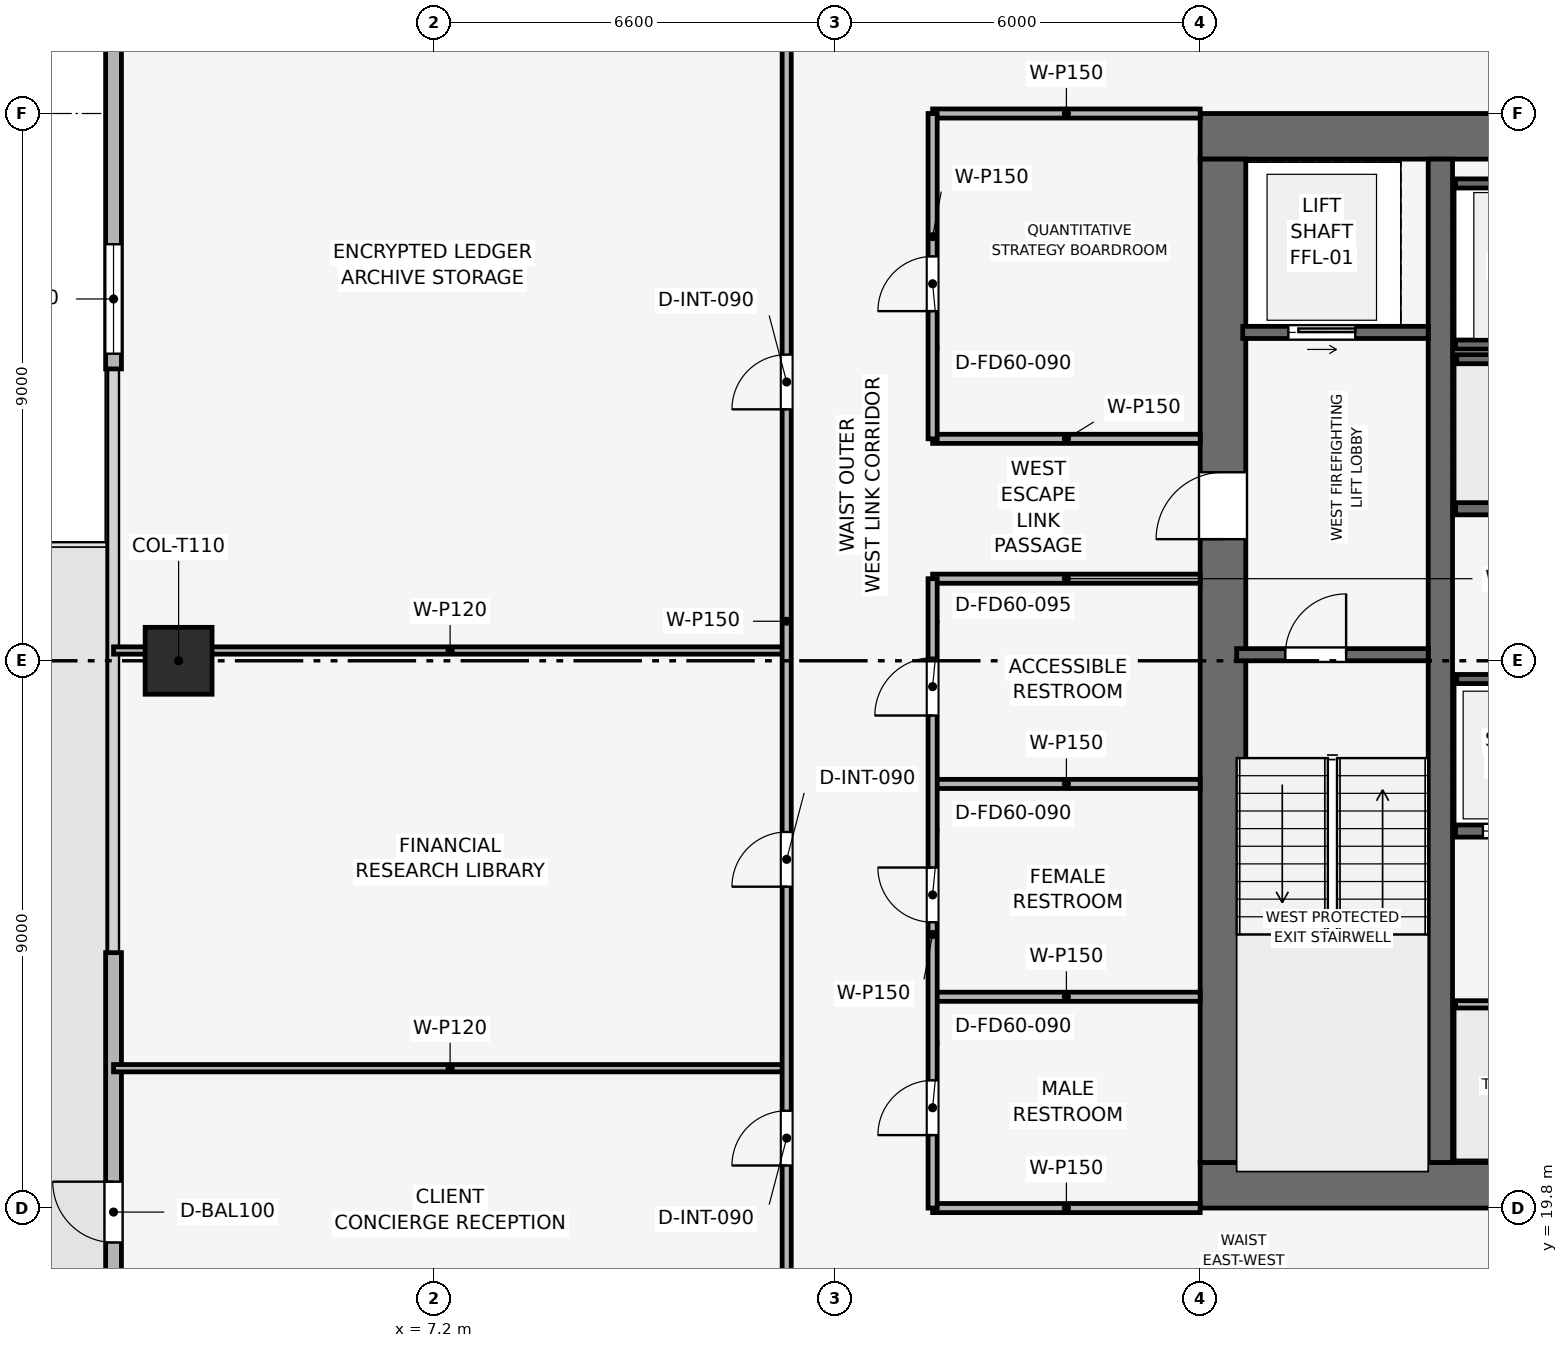
"""IFC4 building model, lengths in metres.
Left out: names, types, materials, properties, quantities, classifications, styles, units other than length and angle.
Written with IfcOpenShell. Run it as: python <this file> out.ifc"""

import sys

from ifc_helpers import new_model, si_unit, direction, frame, frame_2d, origin, origin_2d, place, context, subcontext, project, spatial, rectangle, extrude, element, fill, save


model = new_model("IFC4")
c1 = context("Model", 3, precision=1e-05, world=origin(), true_north=direction((0.0, 1.0)))
c2 = subcontext(c1, "Body", "Model", "MODEL_VIEW")
j1 = project(units=[si_unit("LENGTHUNIT", "METRE"), si_unit("PLANEANGLEUNIT", "RADIAN")], contexts=[c1])
p1 = place(None, origin())
s1 = spatial("IfcSite", under=j1, at=p1, CompositionType="ELEMENT")
p2 = place(p1, origin())
s2 = spatial("IfcBuilding", under=s1, at=p2, CompositionType="ELEMENT")
p3 = place(p2, frame((0.0, 0.0, 237.45)))
s3 = spatial("IfcBuildingStorey", under=s2, at=p3, CompositionType="ELEMENT", Elevation=237.45)
p4 = place(p3, frame((19.8, 20.175, 0.0), z_axis=(0.0, 0.0, 1.0), x_axis=(1.0, 0.0, 0.0)))
e1 = element("IfcWall", 1, at=p4, inside=s3, PredefinedType="SHEAR", context=c2, shape_type="SweptSolid", body=[
    extrude(rectangle(XDim=18.0, YDim=0.75, at=frame_2d((9.0, 0.0))), origin(), (0.0, 0.0, 1.0), 3.75),
])
p5 = place(p4, frame((8.4, 0.0, 0.0)))
e2 = element("IfcOpeningElement", 2, at=p5, cuts=e1, PredefinedType="OPENING", context=c2, shape_type="SweptSolid", body=[
    extrude(rectangle(XDim=1.2, YDim=2.2, at=frame_2d((0.6, 1.1))), frame((0.0, 0.385, 0.0), z_axis=(0.0, -1.0, 0.0), x_axis=(1.0, 0.0, 0.0)), (0.0, 0.0, 1.0), 0.77),
])
p6 = place(p3, frame((19.8, 37.425, 0.0), z_axis=(0.0, 0.0, 1.0), x_axis=(1.0, 0.0, 0.0)))
e3 = element("IfcWall", 3, at=p6, inside=s3, PredefinedType="SHEAR", context=c2, shape_type="SweptSolid", body=[
    extrude(rectangle(XDim=18.0, YDim=0.75, at=frame_2d((9.0, 0.0))), origin(), (0.0, 0.0, 1.0), 3.75),
])
p7 = place(p6, frame((7.05, 0.0, 0.0)))
e4 = element("IfcOpeningElement", 4, at=p7, cuts=e3, PredefinedType="OPENING", context=c2, shape_type="SweptSolid", body=[
    extrude(rectangle(XDim=1.1, YDim=2.15, at=frame_2d((0.55, 1.075))), frame((0.0, 0.385, 0.0), z_axis=(0.0, -1.0, 0.0), x_axis=(1.0, 0.0, 0.0)), (0.0, 0.0, 1.0), 0.77),
])
p8 = place(p3, frame((20.175, 20.55, 0.0), z_axis=(0.0, 0.0, 1.0), x_axis=(0.0, 1.0, 0.0)))
e5 = element("IfcWall", 5, at=p8, inside=s3, PredefinedType="SHEAR", context=c2, shape_type="SweptSolid", body=[
    extrude(rectangle(XDim=16.5, YDim=0.75, at=frame_2d((8.25, 0.0))), origin(), (0.0, 0.0, 1.0), 3.75),
])
p9 = place(p8, frame((10.25, 0.0, 0.0)))
e6 = element("IfcOpeningElement", 6, at=p9, cuts=e5, PredefinedType="OPENING", context=c2, shape_type="SweptSolid", body=[
    extrude(rectangle(XDim=1.1, YDim=2.15, at=frame_2d((0.55, 1.075))), frame((0.0, 0.385, 0.0), z_axis=(0.0, -1.0, 0.0), x_axis=(1.0, 0.0, 0.0)), (0.0, 0.0, 1.0), 0.77),
])
p10 = place(p3, frame((23.75, 20.55, 0.0), z_axis=(0.0, 0.0, 1.0), x_axis=(0.0, 1.0, 0.0)))
e7 = element("IfcWall", 7, at=p10, inside=s3, PredefinedType="SHEAR", context=c2, shape_type="SweptSolid", body=[
    extrude(rectangle(XDim=16.5, YDim=0.4, at=frame_2d((8.25, 0.0))), origin(), (0.0, 0.0, 1.0), 3.75),
])
p11 = place(p3, frame((3.0, 28.8, 0.003), z_axis=(0.0, 0.0, 1.0), x_axis=(1.0, 0.0, 0.0)))
e8 = element("IfcColumn", 8, at=p11, inside=s3, PredefinedType="COLUMN", context=c2, shape_type="SweptSolid", body=[
    extrude(rectangle(XDim=1.1, YDim=1.1, at=origin_2d()), origin(), (0.0, 0.0, 1.0), 3.494),
])
p12 = place(p3, frame((1.93, 9.3, 0.0), z_axis=(0.0, 0.0, 1.0), x_axis=(0.0, 1.0, 0.0)))
e9 = element("IfcWall", 9, at=p12, inside=s3, PredefinedType="SOLIDWALL", context=c2, shape_type="SweptSolid", body=[
    extrude(rectangle(XDim=14.7, YDim=0.26, at=frame_2d((7.35, 0.0))), origin(), (0.0, 0.0, 1.0), 3.5),
])
p13 = place(p12, frame((9.934, 0.0, 0.0)))
e10 = element("IfcOpeningElement", 10, at=p13, cuts=e9, PredefinedType="OPENING", context=c2, shape_type="SweptSolid", body=[
    extrude(rectangle(XDim=1.0, YDim=2.2, at=frame_2d((0.5, 1.1))), frame((0.0, 0.14, 0.0), z_axis=(0.0, -1.0, 0.0), x_axis=(1.0, 0.0, 0.0)), (0.0, 0.0, 1.0), 0.28),
])
p14 = place(p3, frame((1.93, 33.6, 0.0), z_axis=(0.0, 0.0, 1.0), x_axis=(0.0, 1.0, 0.0)))
e11 = element("IfcWall", 11, at=p14, inside=s3, PredefinedType="SOLIDWALL", context=c2, shape_type="SweptSolid", body=[
    extrude(rectangle(XDim=14.7, YDim=0.26, at=frame_2d((7.35, 0.0))), origin(), (0.0, 0.0, 1.0), 3.5),
])
p15 = place(p14, frame((0.25, 0.0, 0.72)))
e12 = element("IfcOpeningElement", 12, at=p15, cuts=e11, PredefinedType="OPENING", context=c2, shape_type="SweptSolid", body=[
    extrude(rectangle(XDim=1.8, YDim=2.1, at=frame_2d((0.9, 1.05))), frame((0.0, 0.14, 0.0), z_axis=(0.0, -1.0, 0.0), x_axis=(1.0, 0.0, 0.0)), (0.0, 0.0, 1.0), 0.28),
])
p16 = place(p3, frame((20.4, 28.9, 0.0), z_axis=(0.0, 0.0, 1.0), x_axis=(1.0, 0.0, 0.0)))
e13 = element("IfcWall", 13, at=p16, inside=s3, PredefinedType="SHEAR", context=c2, shape_type="SweptSolid", body=[
    extrude(rectangle(XDim=3.15, YDim=0.2, at=frame_2d((1.575, 0.0))), origin(), (0.0, 0.0, 1.0), 3.5),
])
p17 = place(p16, frame((0.8, 0.0, 0.0)))
e14 = element("IfcOpeningElement", 14, at=p17, cuts=e13, PredefinedType="OPENING", context=c2, shape_type="SweptSolid", body=[
    extrude(rectangle(XDim=1.0, YDim=2.1, at=frame_2d((0.5, 1.05))), frame((0.0, 0.11, 0.0), z_axis=(0.0, -1.0, 0.0), x_axis=(1.0, 0.0, 0.0)), (0.0, 0.0, 1.0), 0.22),
])
p18 = place(p3, frame((20.5, 34.2, 0.0), z_axis=(0.0, 0.0, 1.0), x_axis=(1.0, 0.0, 0.0)))
e15 = element("IfcWall", 15, at=p18, inside=s3, PredefinedType="SHEAR", context=c2, shape_type="SweptSolid", body=[
    extrude(rectangle(XDim=3.05, YDim=0.2, at=frame_2d((1.525, 0.0))), origin(), (0.0, 0.0, 1.0), 3.5),
])
p19 = place(p18, frame((0.75, 0.0, 0.0)))
e16 = element("IfcOpeningElement", 16, at=p19, cuts=e15, PredefinedType="OPENING", context=c2, shape_type="SweptSolid", body=[
    extrude(rectangle(XDim=1.1, YDim=2.15, at=frame_2d((0.55, 1.075))), frame((0.0, 0.11, 0.0), z_axis=(0.0, -1.0, 0.0), x_axis=(1.0, 0.0, 0.0)), (0.0, 0.0, 1.0), 0.22),
])
for number, where, z_axis, x_axis in (
    (17, (24.0, 34.0, 0.0), (0.0, 0.0, 1.0), (1.0, 0.0, 0.0)),
    (18, (24.0, 36.65, 0.0), (0.0, 0.0, 1.0), (1.0, 0.0, 0.0)),
):
    element("IfcWall", number, at=place(p3, frame(where, z_axis=z_axis, x_axis=x_axis)), inside=s3, PredefinedType="SHEAR", context=c2, shape_type="SweptSolid", body=[
        extrude(rectangle(XDim=2.48, YDim=0.15, at=frame_2d((1.24, 0.0))), origin(), (0.0, 0.0, 1.0), 3.5),
    ])
p20 = place(p3, frame((24.0, 26.0, 0.0), z_axis=(0.0, 0.0, 1.0), x_axis=(1.0, 0.0, 0.0)))
e19 = element("IfcWall", 19, at=p20, inside=s3, PredefinedType="SHEAR", context=c2, shape_type="SweptSolid", body=[
    extrude(rectangle(XDim=2.0, YDim=0.2, at=frame_2d((1.0, 0.0))), origin(), (0.0, 0.0, 1.0), 3.5),
])
p21 = place(p20, frame((0.45, 0.0, 0.0)))
e20 = element("IfcOpeningElement", 20, at=p21, cuts=e19, PredefinedType="OPENING", context=c2, shape_type="SweptSolid", body=[
    extrude(rectangle(XDim=1.1, YDim=2.15, at=frame_2d((0.55, 1.075))), frame((0.0, 0.11, 0.0), z_axis=(0.0, -1.0, 0.0), x_axis=(1.0, 0.0, 0.0)), (0.0, 0.0, 1.0), 0.22),
])
p22 = place(p3, frame((24.0, 31.3, 0.0), z_axis=(0.0, 0.0, 1.0), x_axis=(1.0, 0.0, 0.0)))
e21 = element("IfcWall", 21, at=p22, inside=s3, PredefinedType="SHEAR", context=c2, shape_type="SweptSolid", body=[
    extrude(rectangle(XDim=2.0, YDim=0.2, at=frame_2d((1.0, 0.0))), origin(), (0.0, 0.0, 1.0), 3.5),
])
for number, where, z_axis, x_axis in (
    (22, (24.02, 28.5, 0.0), (0.0, 0.0, 1.0), (1.0, 0.0, 0.0)),
    (23, (24.02, 33.76, 0.0), (0.0, 0.0, 1.0), (1.0, 0.0, 0.0)),
):
    element("IfcWall", number, at=place(p3, frame(where, z_axis=z_axis, x_axis=x_axis)), inside=s3, PredefinedType="SHEAR", context=c2, shape_type="SweptSolid", body=[
        extrude(rectangle(XDim=4.08, YDim=0.15, at=frame_2d((2.04, 0.0))), origin(), (0.0, 0.0, 1.0), 3.5),
    ])
p23 = place(p3, frame((24.0, 23.15, 0.0), z_axis=(0.0, 0.0, 1.0), x_axis=(1.0, 0.0, 0.0)))
e24 = element("IfcWall", 24, at=p23, inside=s3, PredefinedType="PARTITIONING", context=c2, shape_type="SweptSolid", body=[
    extrude(rectangle(XDim=4.05, YDim=0.12, at=frame_2d((2.025, 0.0))), origin(), (0.0, 0.0, 1.0), 3.5),
])
p24 = place(p23, frame((1.575, 0.0, 0.0)))
e25 = element("IfcOpeningElement", 25, at=p24, cuts=e24, PredefinedType="OPENING", context=c2, shape_type="SweptSolid", body=[
    extrude(rectangle(XDim=0.9, YDim=2.1, at=frame_2d((0.45, 1.05))), frame((0.0, 0.07, 0.0), z_axis=(0.0, -1.0, 0.0), x_axis=(1.0, 0.0, 0.0)), (0.0, 0.0, 1.0), 0.14),
])
p25 = place(p3, frame((15.4, 19.8, 0.0), z_axis=(0.0, 0.0, 1.0), x_axis=(1.0, 0.0, 0.0)))
e26 = element("IfcWall", 26, at=p25, inside=s3, PredefinedType="PARTITIONING", context=c2, shape_type="SweptSolid", body=[
    extrude(rectangle(XDim=4.4, YDim=0.15, at=frame_2d((2.2, 0.0))), origin(), (0.0, 0.0, 1.0), 3.035),
])
for number, where, z_axis, x_axis in (
    (27, (15.4, 23.275, 0.0), (0.0, 0.0, 1.0), (1.0, 0.0, 0.0)),
    (28, (15.4, 26.775, 0.0), (0.0, 0.0, 1.0), (1.0, 0.0, 0.0)),
    (29, (15.4, 30.15, 0.0), (0.0, 0.0, 1.0), (1.0, 0.0, 0.0)),
    (30, (15.4, 32.45, 0.0), (0.0, 0.0, 1.0), (1.0, 0.0, 0.0)),
):
    element("IfcWall", number, at=place(p3, frame(where, z_axis=z_axis, x_axis=x_axis)), inside=s3, PredefinedType="PARTITIONING", context=c2, shape_type="SweptSolid", body=[
        extrude(rectangle(XDim=4.4, YDim=0.15, at=frame_2d((2.2, 0.0))), origin(), (0.0, 0.0, 1.0), 3.5),
    ])
p26 = place(p3, frame((15.4, 37.8, 0.0), z_axis=(0.0, 0.0, 1.0), x_axis=(1.0, 0.0, 0.0)))
e31 = element("IfcWall", 31, at=p26, inside=s3, PredefinedType="PARTITIONING", context=c2, shape_type="SweptSolid", body=[
    extrude(rectangle(XDim=4.4, YDim=0.15, at=frame_2d((2.2, 0.0))), origin(), (0.0, 0.0, 1.0), 3.035),
])
p27 = place(p3, frame((15.4, 19.8, 0.0), z_axis=(0.0, 0.0, 1.0), x_axis=(0.0, 1.0, 0.0)))
e32 = element("IfcWall", 32, at=p27, inside=s3, PredefinedType="PARTITIONING", context=c2, shape_type="SweptSolid", body=[
    extrude(rectangle(XDim=10.35, YDim=0.15, at=frame_2d((5.175, 0.0))), origin(), (0.0, 0.0, 1.0), 3.035),
])
p28 = place(p27, frame((1.2, 0.0, 0.0)))
e33 = element("IfcOpeningElement", 33, at=p28, cuts=e32, PredefinedType="OPENING", context=c2, shape_type="SweptSolid", body=[
    extrude(rectangle(XDim=0.9, YDim=2.1, at=frame_2d((0.45, 1.05))), frame((0.0, 0.085, 0.0), z_axis=(0.0, -1.0, 0.0), x_axis=(1.0, 0.0, 0.0)), (0.0, 0.0, 1.0), 0.17),
])
p29 = place(p27, frame((4.7, 0.0, 0.0)))
e34 = element("IfcOpeningElement", 34, at=p29, cuts=e32, PredefinedType="OPENING", context=c2, shape_type="SweptSolid", body=[
    extrude(rectangle(XDim=0.9, YDim=2.1, at=frame_2d((0.45, 1.05))), frame((0.0, 0.085, 0.0), z_axis=(0.0, -1.0, 0.0), x_axis=(1.0, 0.0, 0.0)), (0.0, 0.0, 1.0), 0.17),
])
p30 = place(p27, frame((8.1, 0.0, 0.0)))
e35 = element("IfcOpeningElement", 35, at=p30, cuts=e32, PredefinedType="OPENING", context=c2, shape_type="SweptSolid", body=[
    extrude(rectangle(XDim=0.95, YDim=2.1, at=frame_2d((0.475, 1.05))), frame((0.0, 0.085, 0.0), z_axis=(0.0, -1.0, 0.0), x_axis=(1.0, 0.0, 0.0)), (0.0, 0.0, 1.0), 0.17),
])
p31 = place(p3, frame((15.4, 32.45, 0.0), z_axis=(0.0, 0.0, 1.0), x_axis=(0.0, 1.0, 0.0)))
e36 = element("IfcWall", 36, at=p31, inside=s3, PredefinedType="PARTITIONING", context=c2, shape_type="SweptSolid", body=[
    extrude(rectangle(XDim=5.35, YDim=0.15, at=frame_2d((2.675, 0.0))), origin(), (0.0, 0.0, 1.0), 3.035),
])
p32 = place(p31, frame((2.1, 0.0, 0.0)))
e37 = element("IfcOpeningElement", 37, at=p32, cuts=e36, PredefinedType="OPENING", context=c2, shape_type="SweptSolid", body=[
    extrude(rectangle(XDim=0.9, YDim=2.1, at=frame_2d((0.45, 1.05))), frame((0.0, 0.085, 0.0), z_axis=(0.0, -1.0, 0.0), x_axis=(1.0, 0.0, 0.0)), (0.0, 0.0, 1.0), 0.17),
])
for number, where, z_axis, x_axis in (
    (38, (1.93, 22.1, 0.0), (0.0, 0.0, 1.0), (1.0, 0.0, 0.0)),
    (39, (1.93, 28.969, 0.0), (0.0, 0.0, 1.0), (1.0, 0.0, 0.0)),
):
    element("IfcWall", number, at=place(p3, frame(where, z_axis=z_axis, x_axis=x_axis)), inside=s3, PredefinedType="PARTITIONING", context=c2, shape_type="SweptSolid", body=[
        extrude(rectangle(XDim=11.07, YDim=0.12, at=frame_2d((5.535, 0.0))), origin(), (0.0, 0.0, 1.0), 2.685),
    ])
p33 = place(p3, frame((13.0, 17.4, 0.0), z_axis=(0.0, 0.0, 1.0), x_axis=(0.0, 1.0, 0.0)))
e40 = element("IfcWall", 40, at=p33, inside=s3, PredefinedType="PARTITIONING", context=c2, shape_type="SweptSolid", body=[
    extrude(rectangle(XDim=22.8, YDim=0.15, at=frame_2d((11.4, 0.0))), origin(), (0.0, 0.0, 1.0), 3.035),
])
p34 = place(p33, frame((3.1, 0.0, 0.0)))
e41 = element("IfcOpeningElement", 41, at=p34, cuts=e40, PredefinedType="OPENING", context=c2, shape_type="SweptSolid", body=[
    extrude(rectangle(XDim=0.9, YDim=2.1, at=frame_2d((0.45, 1.05))), frame((0.0, 0.085, 0.0), z_axis=(0.0, -1.0, 0.0), x_axis=(1.0, 0.0, 0.0)), (0.0, 0.0, 1.0), 0.17),
])
p35 = place(p33, frame((7.685, 0.0, 0.0)))
e42 = element("IfcOpeningElement", 42, at=p35, cuts=e40, PredefinedType="OPENING", context=c2, shape_type="SweptSolid", body=[
    extrude(rectangle(XDim=0.9, YDim=2.1, at=frame_2d((0.45, 1.05))), frame((0.0, 0.085, 0.0), z_axis=(0.0, -1.0, 0.0), x_axis=(1.0, 0.0, 0.0)), (0.0, 0.0, 1.0), 0.17),
])
p36 = place(p33, frame((15.535, 0.0, 0.0)))
e43 = element("IfcOpeningElement", 43, at=p36, cuts=e40, PredefinedType="OPENING", context=c2, shape_type="SweptSolid", body=[
    extrude(rectangle(XDim=0.9, YDim=2.1, at=frame_2d((0.45, 1.05))), frame((0.0, 0.085, 0.0), z_axis=(0.0, -1.0, 0.0), x_axis=(1.0, 0.0, 0.0)), (0.0, 0.0, 1.0), 0.17),
])
p37 = place(p13, origin())
e44 = element("IfcDoor", 44, at=p37, inside=s3, OperationType="SINGLE_SWING_RIGHT", PredefinedType="DOOR", context=c2, shape_type="SweptSolid", body=[
    extrude(rectangle(XDim=1.0, YDim=2.2, at=frame_2d((0.5, 1.1))), frame((0.0, 0.025, 0.0), z_axis=(0.0, -1.0, 0.0), x_axis=(1.0, 0.0, 0.0)), (0.0, 0.0, 1.0), 0.05),
])
fill(e10, e44)
p38 = place(p15, origin())
e45 = element("IfcWindow", 45, at=p38, inside=s3, PartitioningType="SINGLE_PANEL", PredefinedType="WINDOW", context=c2, shape_type="SweptSolid", body=[
    extrude(rectangle(XDim=1.8, YDim=2.1, at=frame_2d((0.9, 1.05))), frame((0.0, 0.03, 0.0), z_axis=(0.0, -1.0, 0.0), x_axis=(1.0, 0.0, 0.0)), (0.0, 0.0, 1.0), 0.06),
])
fill(e12, e45)
p39 = place(p17, origin())
e46 = element("IfcDoor", 46, at=p39, inside=s3, OperationType="SINGLE_SWING_RIGHT", PredefinedType="DOOR", context=c2, shape_type="SweptSolid", body=[
    extrude(rectangle(XDim=1.0, YDim=2.1, at=frame_2d((0.5, 1.05))), frame((0.0, 0.025, 0.0), z_axis=(0.0, -1.0, 0.0), x_axis=(1.0, 0.0, 0.0)), (0.0, 0.0, 1.0), 0.05),
])
fill(e14, e46)
p40 = place(p19, origin())
e47 = element("IfcDoor", 47, at=p40, inside=s3, OperationType="SLIDING_TO_RIGHT", PredefinedType="DOOR", context=c2, shape_type="SweptSolid", body=[
    extrude(rectangle(XDim=1.1, YDim=2.15, at=frame_2d((0.55, 1.075))), frame((0.0, 0.025, 0.0), z_axis=(0.0, -1.0, 0.0), x_axis=(1.0, 0.0, 0.0)), (0.0, 0.0, 1.0), 0.05),
])
fill(e16, e47)
p41 = place(p21, origin())
e48 = element("IfcDoor", 48, at=p41, inside=s3, OperationType="SLIDING_TO_RIGHT", PredefinedType="DOOR", context=c2, shape_type="SweptSolid", body=[
    extrude(rectangle(XDim=1.1, YDim=2.15, at=frame_2d((0.55, 1.075))), frame((0.0, 0.025, 0.0), z_axis=(0.0, -1.0, 0.0), x_axis=(1.0, 0.0, 0.0)), (0.0, 0.0, 1.0), 0.05),
])
fill(e20, e48)
p42 = place(p28, origin())
e49 = element("IfcDoor", 49, at=p42, inside=s3, OperationType="SINGLE_SWING_LEFT", PredefinedType="DOOR", context=c2, shape_type="SweptSolid", body=[
    extrude(rectangle(XDim=0.9, YDim=2.1, at=frame_2d((0.45, 1.05))), frame((0.0, 0.025, 0.0), z_axis=(0.0, -1.0, 0.0), x_axis=(1.0, 0.0, 0.0)), (0.0, 0.0, 1.0), 0.05),
])
fill(e33, e49)
p43 = place(p29, origin())
e50 = element("IfcDoor", 50, at=p43, inside=s3, OperationType="SINGLE_SWING_RIGHT", PredefinedType="DOOR", context=c2, shape_type="SweptSolid", body=[
    extrude(rectangle(XDim=0.9, YDim=2.1, at=frame_2d((0.45, 1.05))), frame((0.0, 0.025, 0.0), z_axis=(0.0, -1.0, 0.0), x_axis=(1.0, 0.0, 0.0)), (0.0, 0.0, 1.0), 0.05),
])
fill(e34, e50)
p44 = place(p30, origin())
e51 = element("IfcDoor", 51, at=p44, inside=s3, OperationType="SINGLE_SWING_LEFT", PredefinedType="DOOR", context=c2, shape_type="SweptSolid", body=[
    extrude(rectangle(XDim=0.95, YDim=2.1, at=frame_2d((0.475, 1.05))), frame((0.0, 0.025, 0.0), z_axis=(0.0, -1.0, 0.0), x_axis=(1.0, 0.0, 0.0)), (0.0, 0.0, 1.0), 0.05),
])
fill(e35, e51)
p45 = place(p32, origin())
e52 = element("IfcDoor", 52, at=p45, inside=s3, OperationType="SINGLE_SWING_LEFT", PredefinedType="DOOR", context=c2, shape_type="SweptSolid", body=[
    extrude(rectangle(XDim=0.9, YDim=2.1, at=frame_2d((0.45, 1.05))), frame((0.0, 0.025, 0.0), z_axis=(0.0, -1.0, 0.0), x_axis=(1.0, 0.0, 0.0)), (0.0, 0.0, 1.0), 0.05),
])
fill(e37, e52)
p46 = place(p34, origin())
e53 = element("IfcDoor", 53, at=p46, inside=s3, OperationType="SINGLE_SWING_LEFT", PredefinedType="DOOR", context=c2, shape_type="SweptSolid", body=[
    extrude(rectangle(XDim=0.9, YDim=2.1, at=frame_2d((0.45, 1.05))), frame((0.0, 0.025, 0.0), z_axis=(0.0, -1.0, 0.0), x_axis=(1.0, 0.0, 0.0)), (0.0, 0.0, 1.0), 0.05),
])
fill(e41, e53)
p47 = place(p35, origin())
e54 = element("IfcDoor", 54, at=p47, inside=s3, OperationType="SINGLE_SWING_LEFT", PredefinedType="DOOR", context=c2, shape_type="SweptSolid", body=[
    extrude(rectangle(XDim=0.9, YDim=2.1, at=frame_2d((0.45, 1.05))), frame((0.0, 0.025, 0.0), z_axis=(0.0, -1.0, 0.0), x_axis=(1.0, 0.0, 0.0)), (0.0, 0.0, 1.0), 0.05),
])
fill(e42, e54)
p48 = place(p36, origin())
e55 = element("IfcDoor", 55, at=p48, inside=s3, OperationType="SINGLE_SWING_LEFT", PredefinedType="DOOR", context=c2, shape_type="SweptSolid", body=[
    extrude(rectangle(XDim=0.9, YDim=2.1, at=frame_2d((0.45, 1.05))), frame((0.0, 0.025, 0.0), z_axis=(0.0, -1.0, 0.0), x_axis=(1.0, 0.0, 0.0)), (0.0, 0.0, 1.0), 0.05),
])
fill(e43, e55)
p49 = place(p9, origin())
e56 = element("IfcDoor", 56, at=p49, inside=s3, OperationType="SINGLE_SWING_LEFT", PredefinedType="DOOR", context=c2, shape_type="SweptSolid", body=[
    extrude(rectangle(XDim=1.1, YDim=2.15, at=frame_2d((0.55, 1.075))), frame((0.0, 0.025, 0.0), z_axis=(0.0, -1.0, 0.0), x_axis=(1.0, 0.0, 0.0)), (0.0, 0.0, 1.0), 0.05),
])
fill(e6, e56)
save(model, sys.argv[1])
